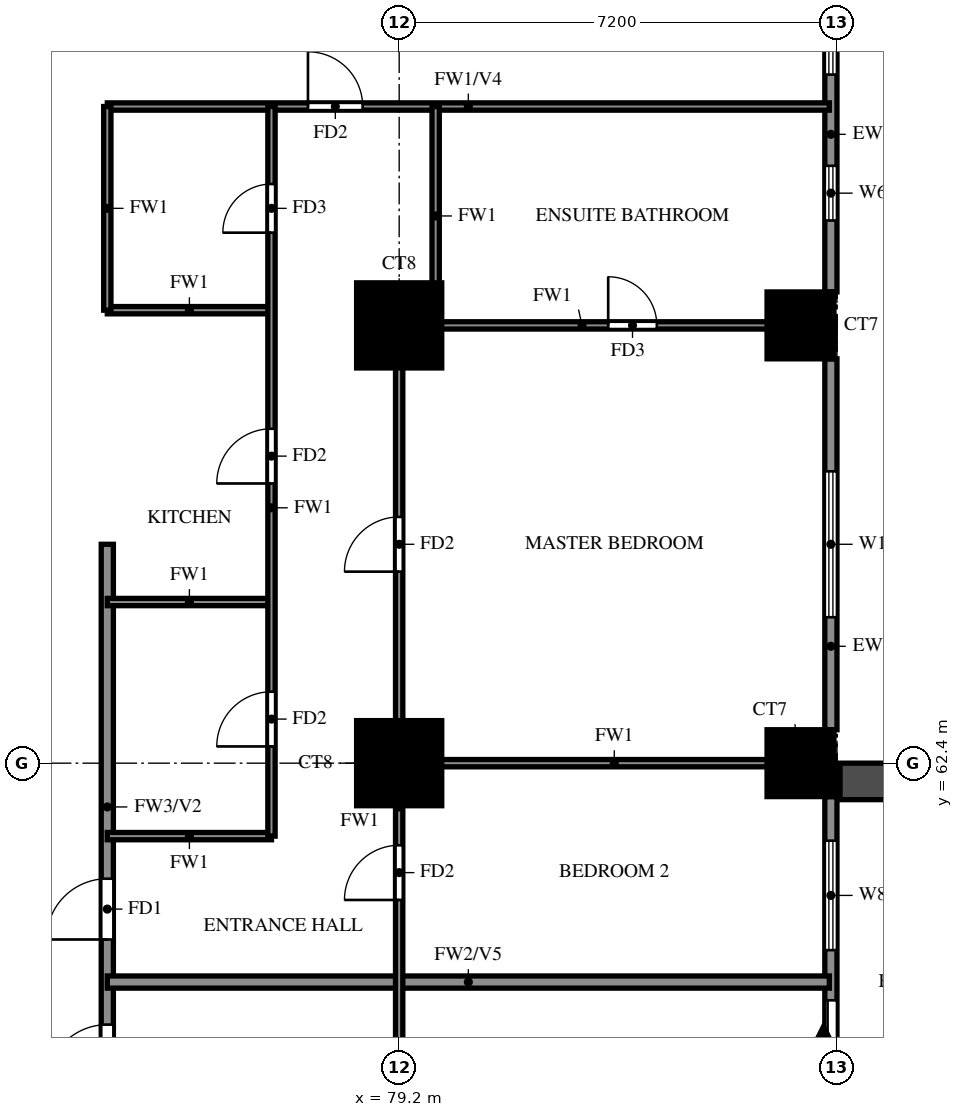
"""IFC4 building model, lengths in metres.
Left out: names, types, materials, properties, quantities, classifications, styles, units other than length and angle.
Written with IfcOpenShell. Run it as: python <this file> out.ifc"""

import sys

from ifc_helpers import new_model, si_unit, direction, frame, frame_2d, origin, origin_2d, place, context, subcontext, project, spatial, rectangle, extrude, source, transform, mapped, element, fill, save


model = new_model("IFC4")
c1 = context("Model", 3, precision=1e-05, world=origin(), true_north=direction((0.0, 1.0)))
c2 = subcontext(c1, "Body", "Model", "MODEL_VIEW")
j1 = project(units=[si_unit("LENGTHUNIT", "METRE"), si_unit("PLANEANGLEUNIT", "RADIAN")], contexts=[c1])
p1 = place(None, origin())
s1 = spatial("IfcSite", under=j1, at=p1, CompositionType="ELEMENT")
p2 = place(p1, origin())
s2 = spatial("IfcBuilding", under=s1, at=p2, CompositionType="ELEMENT")
p3 = place(p2, frame((0.0, 0.0, 51.5)))
s3 = spatial("IfcBuildingStorey", under=s2, at=p3, CompositionType="ELEMENT", Elevation=51.5)
m1 = source(origin(), c2, "Body", "SweptSolid", [
    extrude(rectangle(XDim=1.4, YDim=1.4, at=origin_2d()), origin(), (0.0, 0.0, 1.0), 3.18),
])
p4 = place(p3, frame((79.2, 62.4, 0.0), z_axis=(0.0, 0.0, 1.0), x_axis=(1.0, 0.0, 0.0)))
e1 = element("IfcColumn", 1, at=p4, inside=s3, PredefinedType="COLUMN", context=c2, shape_type="MappedRepresentation", body=[
    mapped(m1, transform((0.0, 0.0, 0.0))),
])
m2 = source(origin(), c2, "Body", "SweptSolid", [
    extrude(rectangle(XDim=1.1, YDim=1.1, at=origin_2d()), origin(), (0.0, 0.0, 1.0), 3.18),
])
p5 = place(p3, frame((85.8, 62.4, 0.0), z_axis=(0.0, 0.0, 1.0), x_axis=(1.0, 0.0, 0.0)))
e2 = element("IfcColumn", 2, at=p5, inside=s3, PredefinedType="COLUMN", context=c2, shape_type="MappedRepresentation", body=[
    mapped(m2, transform((0.0, 0.0, 0.0))),
])
p6 = place(p3, frame((79.2, 69.6, 0.0), z_axis=(0.0, 0.0, 1.0), x_axis=(1.0, 0.0, 0.0)))
e3 = element("IfcColumn", 3, at=p6, inside=s3, PredefinedType="COLUMN", context=c2, shape_type="MappedRepresentation", body=[
    mapped(m1, transform((0.0, 0.0, 0.0))),
])
p7 = place(p3, frame((85.8, 69.6, 0.0), z_axis=(0.0, 0.0, 1.0), x_axis=(1.0, 0.0, 0.0)))
e4 = element("IfcColumn", 4, at=p7, inside=s3, PredefinedType="COLUMN", context=c2, shape_type="MappedRepresentation", body=[
    mapped(m2, transform((0.0, 0.0, 0.0))),
])
p8 = place(p3, frame((86.3, 55.75, 0.0), z_axis=(0.0, 0.0, 1.0), x_axis=(0.0, 1.0, 0.0)))
e5 = element("IfcWall", 5, at=p8, inside=s3, PredefinedType="SOLIDWALL", context=c2, shape_type="SweptSolid", body=[
    extrude(rectangle(XDim=6.1, YDim=0.2, at=frame_2d((3.05, 0.0))), origin(), (0.0, 0.0, 1.0), 3.18),
])
p9 = place(p8, frame((0.95, 0.0, 0.0)))
e6 = element("IfcOpeningElement", 6, at=p9, cuts=e5, PredefinedType="OPENING", context=c2, shape_type="SweptSolid", body=[
    extrude(rectangle(XDim=1.8, YDim=2.4, at=frame_2d((0.9, 1.2))), frame((0.0, 0.11, 0.0), z_axis=(0.0, -1.0, 0.0), x_axis=(1.0, 0.0, 0.0)), (0.0, 0.0, 1.0), 0.22),
])
p10 = place(p8, frame((3.575, 0.0, 0.6)))
e7 = element("IfcOpeningElement", 7, at=p10, cuts=e5, PredefinedType="OPENING", context=c2, shape_type="SweptSolid", body=[
    extrude(rectangle(XDim=1.8, YDim=2.4, at=frame_2d((0.9, 1.2))), frame((0.0, 0.11, 0.0), z_axis=(0.0, -1.0, 0.0), x_axis=(1.0, 0.0, 0.0)), (0.0, 0.0, 1.0), 0.22),
])
p11 = place(p3, frame((86.3, 62.95, 0.0), z_axis=(0.0, 0.0, 1.0), x_axis=(0.0, 1.0, 0.0)))
e8 = element("IfcWall", 8, at=p11, inside=s3, PredefinedType="SOLIDWALL", context=c2, shape_type="SweptSolid", body=[
    extrude(rectangle(XDim=6.1, YDim=0.2, at=frame_2d((3.05, 0.0))), origin(), (0.0, 0.0, 1.0), 3.18),
])
p12 = place(p11, frame((1.85, 0.0, 0.6)))
e9 = element("IfcOpeningElement", 9, at=p12, cuts=e8, PredefinedType="OPENING", context=c2, shape_type="SweptSolid", body=[
    extrude(rectangle(XDim=2.4, YDim=2.4, at=frame_2d((1.2, 1.2))), frame((0.0, 0.11, 0.0), z_axis=(0.0, -1.0, 0.0), x_axis=(1.0, 0.0, 0.0)), (0.0, 0.0, 1.0), 0.22),
])
p13 = place(p3, frame((86.3, 70.15, 0.0), z_axis=(0.0, 0.0, 1.0), x_axis=(0.0, 1.0, 0.0)))
e10 = element("IfcWall", 10, at=p13, inside=s3, PredefinedType="SOLIDWALL", context=c2, shape_type="SweptSolid", body=[
    extrude(rectangle(XDim=6.1, YDim=0.2, at=frame_2d((3.05, 0.0))), origin(), (0.0, 0.0, 1.0), 3.18),
])
p14 = place(p13, frame((1.175, 0.0, 1.5)))
e11 = element("IfcOpeningElement", 11, at=p14, cuts=e10, PredefinedType="OPENING", context=c2, shape_type="SweptSolid", body=[
    extrude(rectangle(XDim=0.9, YDim=0.9, at=frame_2d((0.45, 0.45))), frame((0.0, 0.11, 0.0), z_axis=(0.0, -1.0, 0.0), x_axis=(1.0, 0.0, 0.0)), (0.0, 0.0, 1.0), 0.22),
])
p15 = place(p13, frame((3.575, 0.0, 0.6)))
e12 = element("IfcOpeningElement", 12, at=p15, cuts=e10, PredefinedType="OPENING", context=c2, shape_type="SweptSolid", body=[
    extrude(rectangle(XDim=1.8, YDim=2.4, at=frame_2d((0.9, 1.2))), frame((0.0, 0.11, 0.0), z_axis=(0.0, -1.0, 0.0), x_axis=(1.0, 0.0, 0.0)), (0.0, 0.0, 1.0), 0.22),
])
p16 = place(p3, frame((86.45, 62.1, 0.0), z_axis=(0.0, 0.0, 1.0), x_axis=(1.0, 0.0, 0.0)))
e13 = element("IfcWall", 13, at=p16, inside=s3, PredefinedType="SOLIDWALL", context=c2, shape_type="SweptSolid", body=[
    extrude(rectangle(XDim=2.65, YDim=0.6, at=frame_2d((1.325, 0.0))), origin(), (0.0, 0.0, 1.0), 2.85),
])
p17 = place(p3, frame((74.4, 56.4, 0.0), z_axis=(0.0, 0.0, 1.0), x_axis=(0.0, 1.0, 0.0)))
e14 = element("IfcWall", 14, at=p17, inside=s3, PredefinedType="SOLIDWALL", context=c2, shape_type="SweptSolid", body=[
    extrude(rectangle(XDim=9.6, YDim=0.2, at=frame_2d((4.8, 0.0))), origin(), (0.0, 0.0, 1.0), 3.18),
])
p18 = place(p17, frame((0.7, 0.0, 0.0)))
e15 = element("IfcOpeningElement", 15, at=p18, cuts=e14, PredefinedType="OPENING", context=c2, shape_type="SweptSolid", body=[
    extrude(rectangle(XDim=1.0, YDim=2.1, at=frame_2d((0.5, 1.05))), frame((0.0, 0.11, 0.0), z_axis=(0.0, -1.0, 0.0), x_axis=(1.0, 0.0, 0.0)), (0.0, 0.0, 1.0), 0.22),
])
p19 = place(p17, frame((3.1, 0.0, 0.0)))
e16 = element("IfcOpeningElement", 16, at=p19, cuts=e14, PredefinedType="OPENING", context=c2, shape_type="SweptSolid", body=[
    extrude(rectangle(XDim=1.0, YDim=2.1, at=frame_2d((0.5, 1.05))), frame((0.0, 0.11, 0.0), z_axis=(0.0, -1.0, 0.0), x_axis=(1.0, 0.0, 0.0)), (0.0, 0.0, 1.0), 0.22),
])
p20 = place(p3, frame((74.4, 58.8, 0.0), z_axis=(0.0, 0.0, 1.0), x_axis=(1.0, 0.0, 0.0)))
e17 = element("IfcWall", 17, at=p20, inside=s3, PredefinedType="SOLIDWALL", context=c2, shape_type="SweptSolid", body=[
    extrude(rectangle(XDim=11.875, YDim=0.2, at=frame_2d((5.938, 0.0))), origin(), (0.0, 0.0, 1.0), 2.28),
])
p21 = place(p3, frame((74.4, 61.2, 0.0), z_axis=(0.0, 0.0, 1.0), x_axis=(1.0, 0.0, 0.0)))
e18 = element("IfcWall", 18, at=p21, inside=s3, PredefinedType="PARTITIONING", context=c2, shape_type="SweptSolid", body=[
    extrude(rectangle(XDim=2.7, YDim=0.12, at=frame_2d((1.35, 0.0))), origin(), (0.0, 0.0, 1.0), 3.18),
])
p22 = place(p3, frame((79.2, 62.4, 0.0), z_axis=(0.0, 0.0, 1.0), x_axis=(1.0, 0.0, 0.0)))
e19 = element("IfcWall", 19, at=p22, inside=s3, PredefinedType="PARTITIONING", context=c2, shape_type="SweptSolid", body=[
    extrude(rectangle(XDim=7.075, YDim=0.12, at=frame_2d((3.538, 0.0))), origin(), (0.0, 0.0, 1.0), 3.18),
])
p23 = place(p3, frame((74.4, 65.05, 0.0), z_axis=(0.0, 0.0, 1.0), x_axis=(1.0, 0.0, 0.0)))
e20 = element("IfcWall", 20, at=p23, inside=s3, PredefinedType="PARTITIONING", context=c2, shape_type="SweptSolid", body=[
    extrude(rectangle(XDim=2.7, YDim=0.12, at=frame_2d((1.35, 0.0))), origin(), (0.0, 0.0, 1.0), 3.18),
])
p24 = place(p3, frame((79.2, 69.6, 0.0), z_axis=(0.0, 0.0, 1.0), x_axis=(1.0, 0.0, 0.0)))
e21 = element("IfcWall", 21, at=p24, inside=s3, PredefinedType="PARTITIONING", context=c2, shape_type="SweptSolid", body=[
    extrude(rectangle(XDim=7.075, YDim=0.12, at=frame_2d((3.538, 0.0))), origin(), (0.0, 0.0, 1.0), 3.18),
])
p25 = place(p24, frame((3.438, 0.0, 0.0)))
e22 = element("IfcOpeningElement", 22, at=p25, cuts=e21, PredefinedType="OPENING", context=c2, shape_type="SweptSolid", body=[
    extrude(rectangle(XDim=0.8, YDim=2.1, at=frame_2d((0.4, 1.05))), frame((0.0, 0.07, 0.0), z_axis=(0.0, -1.0, 0.0), x_axis=(1.0, 0.0, 0.0)), (0.0, 0.0, 1.0), 0.14),
])
p26 = place(p3, frame((74.4, 69.85, 0.0), z_axis=(0.0, 0.0, 1.0), x_axis=(1.0, 0.0, 0.0)))
e23 = element("IfcWall", 23, at=p26, inside=s3, PredefinedType="PARTITIONING", context=c2, shape_type="SweptSolid", body=[
    extrude(rectangle(XDim=2.7, YDim=0.12, at=frame_2d((1.35, 0.0))), origin(), (0.0, 0.0, 1.0), 3.18),
])
p27 = place(p3, frame((74.4, 73.2, 0.0), z_axis=(0.0, 0.0, 1.0), x_axis=(1.0, 0.0, 0.0)))
e24 = element("IfcWall", 24, at=p27, inside=s3, PredefinedType="PARTITIONING", context=c2, shape_type="SweptSolid", body=[
    extrude(rectangle(XDim=11.875, YDim=0.12, at=frame_2d((5.938, 0.0))), origin(), (0.0, 0.0, 1.0), 2.28),
])
p28 = place(p27, frame((3.3, 0.0, 0.0)))
e25 = element("IfcOpeningElement", 25, at=p28, cuts=e24, PredefinedType="OPENING", context=c2, shape_type="SweptSolid", body=[
    extrude(rectangle(XDim=0.9, YDim=2.1, at=frame_2d((0.45, 1.05))), frame((0.0, 0.07, 0.0), z_axis=(0.0, -1.0, 0.0), x_axis=(1.0, 0.0, 0.0)), (0.0, 0.0, 1.0), 0.14),
])
p29 = place(p3, frame((74.4, 69.85, 0.0), z_axis=(0.0, 0.0, 1.0), x_axis=(0.0, 1.0, 0.0)))
e26 = element("IfcWall", 26, at=p29, inside=s3, PredefinedType="PARTITIONING", context=c2, shape_type="SweptSolid", body=[
    extrude(rectangle(XDim=3.35, YDim=0.12, at=frame_2d((1.675, 0.0))), origin(), (0.0, 0.0, 1.0), 3.18),
])
p30 = place(p3, frame((77.1, 61.2, 0.0), z_axis=(0.0, 0.0, 1.0), x_axis=(0.0, 1.0, 0.0)))
e27 = element("IfcWall", 27, at=p30, inside=s3, PredefinedType="PARTITIONING", context=c2, shape_type="SweptSolid", body=[
    extrude(rectangle(XDim=12.0, YDim=0.12, at=frame_2d((6.0, 0.0))), origin(), (0.0, 0.0, 1.0), 3.18),
])
p31 = place(p30, frame((1.475, 0.0, 0.0)))
e28 = element("IfcOpeningElement", 28, at=p31, cuts=e27, PredefinedType="OPENING", context=c2, shape_type="SweptSolid", body=[
    extrude(rectangle(XDim=0.9, YDim=2.1, at=frame_2d((0.45, 1.05))), frame((0.0, 0.07, 0.0), z_axis=(0.0, -1.0, 0.0), x_axis=(1.0, 0.0, 0.0)), (0.0, 0.0, 1.0), 0.14),
])
p32 = place(p30, frame((5.8, 0.0, 0.0)))
e29 = element("IfcOpeningElement", 29, at=p32, cuts=e27, PredefinedType="OPENING", context=c2, shape_type="SweptSolid", body=[
    extrude(rectangle(XDim=0.9, YDim=2.1, at=frame_2d((0.45, 1.05))), frame((0.0, 0.07, 0.0), z_axis=(0.0, -1.0, 0.0), x_axis=(1.0, 0.0, 0.0)), (0.0, 0.0, 1.0), 0.14),
])
p33 = place(p30, frame((9.925, 0.0, 0.0)))
e30 = element("IfcOpeningElement", 30, at=p33, cuts=e27, PredefinedType="OPENING", context=c2, shape_type="SweptSolid", body=[
    extrude(rectangle(XDim=0.8, YDim=2.1, at=frame_2d((0.4, 1.05))), frame((0.0, 0.07, 0.0), z_axis=(0.0, -1.0, 0.0), x_axis=(1.0, 0.0, 0.0)), (0.0, 0.0, 1.0), 0.14),
])
p34 = place(p3, frame((79.2, 55.2, 0.0), z_axis=(0.0, 0.0, 1.0), x_axis=(0.0, 1.0, 0.0)))
e31 = element("IfcWall", 31, at=p34, inside=s3, PredefinedType="PARTITIONING", context=c2, shape_type="SweptSolid", body=[
    extrude(rectangle(XDim=14.4, YDim=0.12, at=frame_2d((7.2, 0.0))), origin(), (0.0, 0.0, 1.0), 3.18),
])
p35 = place(p34, frame((1.05, 0.0, 0.0)))
e32 = element("IfcOpeningElement", 32, at=p35, cuts=e31, PredefinedType="OPENING", context=c2, shape_type="SweptSolid", body=[
    extrude(rectangle(XDim=1.5, YDim=2.1, at=frame_2d((0.75, 1.05))), frame((0.0, 0.07, 0.0), z_axis=(0.0, -1.0, 0.0), x_axis=(1.0, 0.0, 0.0)), (0.0, 0.0, 1.0), 0.14),
])
p36 = place(p34, frame((4.95, 0.0, 0.0)))
e33 = element("IfcOpeningElement", 33, at=p36, cuts=e31, PredefinedType="OPENING", context=c2, shape_type="SweptSolid", body=[
    extrude(rectangle(XDim=0.9, YDim=2.1, at=frame_2d((0.45, 1.05))), frame((0.0, 0.07, 0.0), z_axis=(0.0, -1.0, 0.0), x_axis=(1.0, 0.0, 0.0)), (0.0, 0.0, 1.0), 0.14),
])
p37 = place(p34, frame((10.35, 0.0, 0.0)))
e34 = element("IfcOpeningElement", 34, at=p37, cuts=e31, PredefinedType="OPENING", context=c2, shape_type="SweptSolid", body=[
    extrude(rectangle(XDim=0.9, YDim=2.1, at=frame_2d((0.45, 1.05))), frame((0.0, 0.07, 0.0), z_axis=(0.0, -1.0, 0.0), x_axis=(1.0, 0.0, 0.0)), (0.0, 0.0, 1.0), 0.14),
])
p38 = place(p3, frame((79.8, 69.6, 0.0), z_axis=(0.0, 0.0, 1.0), x_axis=(0.0, 1.0, 0.0)))
e35 = element("IfcWall", 35, at=p38, inside=s3, PredefinedType="PARTITIONING", context=c2, shape_type="SweptSolid", body=[
    extrude(rectangle(XDim=3.6, YDim=0.12, at=frame_2d((1.8, 0.0))), origin(), (0.0, 0.0, 1.0), 3.18),
])
p39 = place(p9, origin())
e36 = element("IfcDoor", 36, at=p39, inside=s3, OperationType="DOUBLE_DOOR_SLIDING", PredefinedType="DOOR", context=c2, shape_type="SweptSolid", body=[
    extrude(rectangle(XDim=1.8, YDim=2.4, at=frame_2d((0.9, 1.2))), frame((0.0, 0.025, 0.0), z_axis=(0.0, -1.0, 0.0), x_axis=(1.0, 0.0, 0.0)), (0.0, 0.0, 1.0), 0.05),
])
fill(e6, e36)
p40 = place(p10, origin())
e37 = element("IfcWindow", 37, at=p40, inside=s3, PartitioningType="DOUBLE_PANEL_VERTICAL", PredefinedType="WINDOW", context=c2, shape_type="SweptSolid", body=[
    extrude(rectangle(XDim=1.8, YDim=2.4, at=frame_2d((0.9, 1.2))), frame((0.0, 0.03, 0.0), z_axis=(0.0, -1.0, 0.0), x_axis=(1.0, 0.0, 0.0)), (0.0, 0.0, 1.0), 0.06),
])
fill(e7, e37)
p41 = place(p12, origin())
e38 = element("IfcWindow", 38, at=p41, inside=s3, PartitioningType="DOUBLE_PANEL_VERTICAL", PredefinedType="WINDOW", context=c2, shape_type="SweptSolid", body=[
    extrude(rectangle(XDim=2.4, YDim=2.4, at=frame_2d((1.2, 1.2))), frame((0.0, 0.03, 0.0), z_axis=(0.0, -1.0, 0.0), x_axis=(1.0, 0.0, 0.0)), (0.0, 0.0, 1.0), 0.06),
])
fill(e9, e38)
p42 = place(p14, origin())
e39 = element("IfcWindow", 39, at=p42, inside=s3, PartitioningType="SINGLE_PANEL", PredefinedType="WINDOW", context=c2, shape_type="SweptSolid", body=[
    extrude(rectangle(XDim=0.9, YDim=0.9, at=frame_2d((0.45, 0.45))), frame((0.0, 0.03, 0.0), z_axis=(0.0, -1.0, 0.0), x_axis=(1.0, 0.0, 0.0)), (0.0, 0.0, 1.0), 0.06),
])
fill(e11, e39)
p43 = place(p15, origin())
e40 = element("IfcWindow", 40, at=p43, inside=s3, PartitioningType="DOUBLE_PANEL_VERTICAL", PredefinedType="WINDOW", context=c2, shape_type="SweptSolid", body=[
    extrude(rectangle(XDim=1.8, YDim=2.4, at=frame_2d((0.9, 1.2))), frame((0.0, 0.03, 0.0), z_axis=(0.0, -1.0, 0.0), x_axis=(1.0, 0.0, 0.0)), (0.0, 0.0, 1.0), 0.06),
])
fill(e12, e40)
p44 = place(p18, origin())
e41 = element("IfcDoor", 41, at=p44, inside=s3, OperationType="SINGLE_SWING_LEFT", PredefinedType="DOOR", context=c2, shape_type="SweptSolid", body=[
    extrude(rectangle(XDim=1.0, YDim=2.1, at=frame_2d((0.5, 1.05))), frame((0.0, 0.025, 0.0), z_axis=(0.0, -1.0, 0.0), x_axis=(1.0, 0.0, 0.0)), (0.0, 0.0, 1.0), 0.05),
])
fill(e15, e41)
p45 = place(p19, origin())
e42 = element("IfcDoor", 42, at=p45, inside=s3, OperationType="SINGLE_SWING_LEFT", PredefinedType="DOOR", context=c2, shape_type="SweptSolid", body=[
    extrude(rectangle(XDim=1.0, YDim=2.1, at=frame_2d((0.5, 1.05))), frame((0.0, 0.025, 0.0), z_axis=(0.0, -1.0, 0.0), x_axis=(1.0, 0.0, 0.0)), (0.0, 0.0, 1.0), 0.05),
])
fill(e16, e42)
p46 = place(p36, origin())
e43 = element("IfcDoor", 43, at=p46, inside=s3, OperationType="SINGLE_SWING_RIGHT", PredefinedType="DOOR", context=c2, shape_type="SweptSolid", body=[
    extrude(rectangle(XDim=0.9, YDim=2.1, at=frame_2d((0.45, 1.05))), frame((0.0, 0.025, 0.0), z_axis=(0.0, -1.0, 0.0), x_axis=(1.0, 0.0, 0.0)), (0.0, 0.0, 1.0), 0.05),
])
fill(e33, e43)
p47 = place(p37, origin())
e44 = element("IfcDoor", 44, at=p47, inside=s3, OperationType="SINGLE_SWING_LEFT", PredefinedType="DOOR", context=c2, shape_type="SweptSolid", body=[
    extrude(rectangle(XDim=0.9, YDim=2.1, at=frame_2d((0.45, 1.05))), frame((0.0, 0.025, 0.0), z_axis=(0.0, -1.0, 0.0), x_axis=(1.0, 0.0, 0.0)), (0.0, 0.0, 1.0), 0.05),
])
fill(e34, e44)
p48 = place(p25, origin())
e45 = element("IfcDoor", 45, at=p48, inside=s3, OperationType="SINGLE_SWING_LEFT", PredefinedType="DOOR", context=c2, shape_type="SweptSolid", body=[
    extrude(rectangle(XDim=0.8, YDim=2.1, at=frame_2d((0.4, 1.05))), frame((0.0, 0.025, 0.0), z_axis=(0.0, -1.0, 0.0), x_axis=(1.0, 0.0, 0.0)), (0.0, 0.0, 1.0), 0.05),
])
fill(e22, e45)
p49 = place(p28, origin())
e46 = element("IfcDoor", 46, at=p49, inside=s3, OperationType="SINGLE_SWING_RIGHT", PredefinedType="DOOR", context=c2, shape_type="SweptSolid", body=[
    extrude(rectangle(XDim=0.9, YDim=2.1, at=frame_2d((0.45, 1.05))), frame((0.0, 0.025, 0.0), z_axis=(0.0, -1.0, 0.0), x_axis=(1.0, 0.0, 0.0)), (0.0, 0.0, 1.0), 0.05),
])
fill(e25, e46)
p50 = place(p31, origin())
e47 = element("IfcDoor", 47, at=p50, inside=s3, OperationType="SINGLE_SWING_LEFT", PredefinedType="DOOR", context=c2, shape_type="SweptSolid", body=[
    extrude(rectangle(XDim=0.9, YDim=2.1, at=frame_2d((0.45, 1.05))), frame((0.0, 0.025, 0.0), z_axis=(0.0, -1.0, 0.0), x_axis=(1.0, 0.0, 0.0)), (0.0, 0.0, 1.0), 0.05),
])
fill(e28, e47)
p51 = place(p32, origin())
e48 = element("IfcDoor", 48, at=p51, inside=s3, OperationType="SINGLE_SWING_LEFT", PredefinedType="DOOR", context=c2, shape_type="SweptSolid", body=[
    extrude(rectangle(XDim=0.9, YDim=2.1, at=frame_2d((0.45, 1.05))), frame((0.0, 0.025, 0.0), z_axis=(0.0, -1.0, 0.0), x_axis=(1.0, 0.0, 0.0)), (0.0, 0.0, 1.0), 0.05),
])
fill(e29, e48)
p52 = place(p33, origin())
e49 = element("IfcDoor", 49, at=p52, inside=s3, OperationType="SINGLE_SWING_RIGHT", PredefinedType="DOOR", context=c2, shape_type="SweptSolid", body=[
    extrude(rectangle(XDim=0.8, YDim=2.1, at=frame_2d((0.4, 1.05))), frame((0.0, 0.025, 0.0), z_axis=(0.0, -1.0, 0.0), x_axis=(1.0, 0.0, 0.0)), (0.0, 0.0, 1.0), 0.05),
])
fill(e30, e49)
save(model, sys.argv[1])
